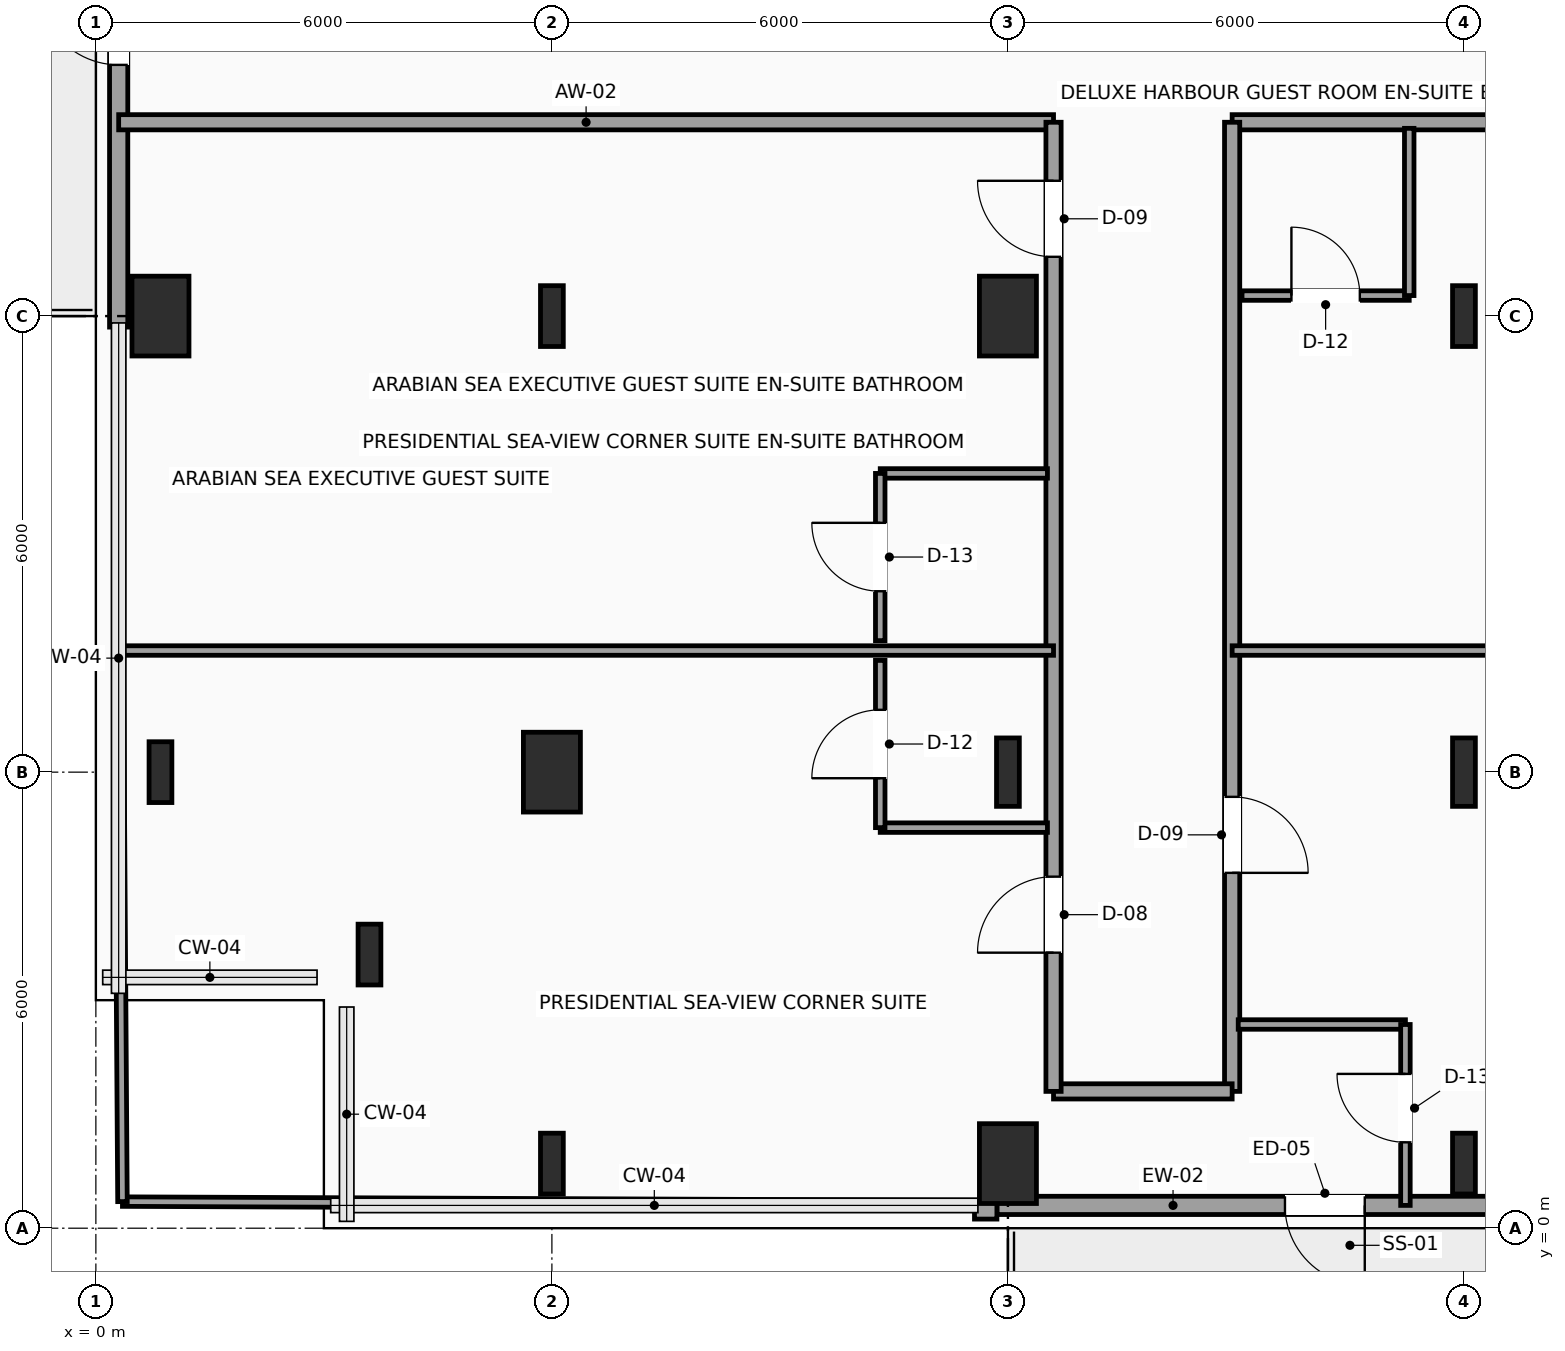
"""IFC4 building model, lengths in metres.
Left out: names, types, materials, properties, quantities, classifications, styles, units other than length and angle.
Written with IfcOpenShell. Run it as: python <this file> out.ifc"""

import sys

from ifc_helpers import new_model, si_unit, direction, frame, frame_2d, origin, origin_2d, place, context, subcontext, project, spatial, rectangle, i_section, extrude, element, fill, save


model = new_model("IFC4")
c1 = context("Model", 3, precision=1e-05, world=origin(), true_north=direction((0.0, 1.0)))
c2 = subcontext(c1, "Body", "Model", "MODEL_VIEW")
j1 = project(units=[si_unit("LENGTHUNIT", "METRE"), si_unit("PLANEANGLEUNIT", "RADIAN")], contexts=[c1])
p1 = place(None, origin())
s1 = spatial("IfcSite", under=j1, at=p1, CompositionType="ELEMENT")
p2 = place(p1, origin())
s2 = spatial("IfcBuilding", under=s1, at=p2, CompositionType="ELEMENT")
p3 = place(p2, frame((0.0, 0.0, 208.65)))
s3 = spatial("IfcBuildingStorey", under=s2, at=p3, CompositionType="ELEMENT", Elevation=208.65)
for number, where, z_axis, x_axis in (
    (1, (3.6, 3.6, 0.0), (0.0, 0.0, 1.0), (1.0, 0.0, 0.0)),
    (2, (0.85, 6.0, 0.0), (0.0, 0.0, 1.0), (1.0, 0.0, 0.0)),
):
    element("IfcColumn", number, at=place(p3, frame(where, z_axis=z_axis, x_axis=x_axis)), inside=s3, PredefinedType="COLUMN", context=c2, shape_type="SweptSolid", body=[
        extrude(i_section(OverallWidth=0.3, OverallDepth=0.8, WebThickness=0.018, FlangeThickness=0.033, FilletRadius=0.03, at=origin_2d()), origin(), (0.0, 0.0, 1.0), 3.75),
    ])
p4 = place(p3, frame((0.85, 12.0, 0.0), z_axis=(0.0, 0.0, 1.0), x_axis=(1.0, 0.0, 0.0)))
e3 = element("IfcColumn", 3, at=p4, inside=s3, PredefinedType="COLUMN", context=c2, shape_type="SweptSolid", body=[
    extrude(rectangle(XDim=0.75, YDim=1.05, at=origin_2d()), origin(), (0.0, 0.0, 1.0), 3.75),
])
p5 = place(p3, frame((6.0, 0.85, 0.0), z_axis=(0.0, 0.0, 1.0), x_axis=(1.0, 0.0, 0.0)))
e4 = element("IfcColumn", 4, at=p5, inside=s3, PredefinedType="COLUMN", context=c2, shape_type="SweptSolid", body=[
    extrude(i_section(OverallWidth=0.3, OverallDepth=0.8, WebThickness=0.018, FlangeThickness=0.033, FilletRadius=0.03, at=origin_2d()), origin(), (0.0, 0.0, 1.0), 3.75),
])
p6 = place(p3, frame((6.0, 6.0, 0.0), z_axis=(0.0, 0.0, 1.0), x_axis=(1.0, 0.0, 0.0)))
e5 = element("IfcColumn", 5, at=p6, inside=s3, PredefinedType="COLUMN", context=c2, shape_type="SweptSolid", body=[
    extrude(rectangle(XDim=0.75, YDim=1.05, at=origin_2d()), origin(), (0.0, 0.0, 1.0), 3.75),
])
p7 = place(p3, frame((6.0, 12.0, 0.0), z_axis=(0.0, 0.0, 1.0), x_axis=(1.0, 0.0, 0.0)))
e6 = element("IfcColumn", 6, at=p7, inside=s3, PredefinedType="COLUMN", context=c2, shape_type="SweptSolid", body=[
    extrude(i_section(OverallWidth=0.3, OverallDepth=0.8, WebThickness=0.018, FlangeThickness=0.033, FilletRadius=0.03, at=origin_2d()), origin(), (0.0, 0.0, 1.0), 3.75),
])
p8 = place(p3, frame((12.0, 0.85, 0.0), z_axis=(0.0, 0.0, 1.0), x_axis=(1.0, 0.0, 0.0)))
e7 = element("IfcColumn", 7, at=p8, inside=s3, PredefinedType="COLUMN", context=c2, shape_type="SweptSolid", body=[
    extrude(rectangle(XDim=0.75, YDim=1.05, at=origin_2d()), origin(), (0.0, 0.0, 1.0), 3.75),
])
p9 = place(p3, frame((12.0, 6.0, 0.0), z_axis=(0.0, 0.0, 1.0), x_axis=(1.0, 0.0, 0.0)))
e8 = element("IfcColumn", 8, at=p9, inside=s3, PredefinedType="COLUMN", context=c2, shape_type="SweptSolid", body=[
    extrude(i_section(OverallWidth=0.3, OverallDepth=0.9, WebThickness=0.019, FlangeThickness=0.035, FilletRadius=0.03, at=origin_2d()), origin(), (0.0, 0.0, 1.0), 3.75),
])
p10 = place(p3, frame((12.0, 12.0, 0.0), z_axis=(0.0, 0.0, 1.0), x_axis=(1.0, 0.0, 0.0)))
e9 = element("IfcColumn", 9, at=p10, inside=s3, PredefinedType="COLUMN", context=c2, shape_type="SweptSolid", body=[
    extrude(rectangle(XDim=0.75, YDim=1.05, at=origin_2d()), origin(), (0.0, 0.0, 1.0), 3.75),
])
p11 = place(p3, frame((18.0, 0.85, 0.0), z_axis=(0.0, 0.0, 1.0), x_axis=(1.0, 0.0, 0.0)))
e10 = element("IfcColumn", 10, at=p11, inside=s3, PredefinedType="COLUMN", context=c2, shape_type="SweptSolid", body=[
    extrude(i_section(OverallWidth=0.3, OverallDepth=0.8, WebThickness=0.018, FlangeThickness=0.033, FilletRadius=0.03, at=origin_2d()), origin(), (0.0, 0.0, 1.0), 3.75),
])
p12 = place(p3, frame((18.0, 6.0, 0.0), z_axis=(0.0, 0.0, 1.0), x_axis=(1.0, 0.0, 0.0)))
e11 = element("IfcColumn", 11, at=p12, inside=s3, PredefinedType="COLUMN", context=c2, shape_type="SweptSolid", body=[
    extrude(i_section(OverallWidth=0.3, OverallDepth=0.9, WebThickness=0.019, FlangeThickness=0.035, FilletRadius=0.03, at=origin_2d()), origin(), (0.0, 0.0, 1.0), 3.75),
])
p13 = place(p3, frame((18.0, 12.0, 0.0), z_axis=(0.0, 0.0, 1.0), x_axis=(1.0, 0.0, 0.0)))
e12 = element("IfcColumn", 12, at=p13, inside=s3, PredefinedType="COLUMN", context=c2, shape_type="SweptSolid", body=[
    extrude(i_section(OverallWidth=0.3, OverallDepth=0.8, WebThickness=0.018, FlangeThickness=0.033, FilletRadius=0.03, at=origin_2d()), origin(), (0.0, 0.0, 1.0), 3.75),
])
p14 = place(p3, frame((21.145, 0.3, 0.0), z_axis=(0.0, 0.0, 1.0), x_axis=(-1.0, 0.0, 0.0)))
e13 = element("IfcWall", 13, at=p14, inside=s3, PredefinedType="SOLIDWALL", context=c2, shape_type="SweptSolid", body=[
    extrude(rectangle(XDim=9.29, YDim=0.24, at=frame_2d((4.645, 0.0))), origin(), (0.0, 0.0, 1.0), 3.54),
])
p15 = place(p14, frame((4.45, 0.0, 0.0)))
e14 = element("IfcOpeningElement", 14, at=p15, cuts=e13, PredefinedType="OPENING", context=c2, shape_type="SweptSolid", body=[
    extrude(rectangle(XDim=1.05, YDim=2.2, at=frame_2d((0.525, 1.1))), frame((0.0, 0.13, 0.0), z_axis=(0.0, -1.0, 0.0), x_axis=(1.0, 0.0, 0.0)), (0.0, 0.0, 1.0), 0.26),
])
p16 = place(p14, frame((0.35, 0.0, 0.85)))
e15 = element("IfcOpeningElement", 15, at=p16, cuts=e13, PredefinedType="OPENING", context=c2, shape_type="SweptSolid", body=[
    extrude(rectangle(XDim=2.1, YDim=2.2, at=frame_2d((1.05, 1.1))), frame((0.0, 0.13, 0.0), z_axis=(0.0, -1.0, 0.0), x_axis=(1.0, 0.0, 0.0)), (0.0, 0.0, 1.0), 0.26),
])
p17 = place(p3, frame((0.3, 11.855, 0.0), z_axis=(0.0, 0.0, 1.0), x_axis=(0.0, 1.0, 0.0)))
e16 = element("IfcWall", 16, at=p17, inside=s3, PredefinedType="SOLIDWALL", context=c2, shape_type="SweptSolid", body=[
    extrude(rectangle(XDim=9.29, YDim=0.24, at=frame_2d((4.645, 0.0))), origin(), (0.0, 0.0, 1.0), 3.54),
])
p18 = place(p17, frame((3.45, 0.0, 0.0)))
e17 = element("IfcOpeningElement", 17, at=p18, cuts=e16, PredefinedType="OPENING", context=c2, shape_type="SweptSolid", body=[
    extrude(rectangle(XDim=1.05, YDim=2.2, at=frame_2d((0.525, 1.1))), frame((0.0, 0.13, 0.0), z_axis=(0.0, -1.0, 0.0), x_axis=(1.0, 0.0, 0.0)), (0.0, 0.0, 1.0), 0.26),
])
p19 = place(p3, frame((11.855, 0.24, 0.0), z_axis=(0.0, 0.0, 1.0), x_axis=(-1.0, 0.0, 0.0)))
e18 = element("IfcWall", 18, at=p19, inside=s3, PredefinedType="SOLIDWALL", context=c2, shape_type="SweptSolid", body=[
    extrude(rectangle(XDim=0.295, YDim=0.24, at=frame_2d((0.147, 0.0))), origin(), (0.0, 0.0, 1.0), 3.54),
])
p20 = place(p3, frame((12.6, 14.55, 0.0), z_axis=(0.0, 0.0, 1.0), x_axis=(-1.0, 0.0, 0.0)))
e19 = element("IfcWall", 19, at=p20, inside=s3, PredefinedType="PARTITIONING", context=c2, shape_type="SweptSolid", body=[
    extrude(rectangle(XDim=12.3, YDim=0.2, at=frame_2d((6.15, 0.0))), origin(), (0.0, 0.0, 1.0), 3.54),
])
p21 = place(p3, frame((23.95, 14.55, 0.0), z_axis=(0.0, 0.0, 1.0), x_axis=(-1.0, 0.0, 0.0)))
e20 = element("IfcWall", 20, at=p21, inside=s3, PredefinedType="PARTITIONING", context=c2, shape_type="SweptSolid", body=[
    extrude(rectangle(XDim=9.0, YDim=0.2, at=frame_2d((4.5, 0.0))), origin(), (0.0, 0.0, 1.0), 3.54),
])
p22 = place(p21, frame((2.815, 0.0, 0.0)))
e21 = element("IfcOpeningElement", 21, at=p22, cuts=e20, PredefinedType="OPENING", context=c2, shape_type="SweptSolid", body=[
    extrude(rectangle(XDim=1.0, YDim=2.2, at=frame_2d((0.5, 1.1))), frame((0.0, 0.11, 0.0), z_axis=(0.0, -1.0, 0.0), x_axis=(1.0, 0.0, 0.0)), (0.0, 0.0, 1.0), 0.22),
])
p23 = place(p3, frame((14.95, 14.55, 0.0), z_axis=(0.0, 0.0, 1.0), x_axis=(0.0, -1.0, 0.0)))
e22 = element("IfcWall", 22, at=p23, inside=s3, PredefinedType="PARTITIONING", context=c2, shape_type="SweptSolid", body=[
    extrude(rectangle(XDim=12.75, YDim=0.2, at=frame_2d((6.375, 0.0))), origin(), (0.0, 0.0, 1.0), 3.54),
])
p24 = place(p23, frame((8.875, 0.0, 0.0)))
e23 = element("IfcOpeningElement", 23, at=p24, cuts=e22, PredefinedType="OPENING", context=c2, shape_type="SweptSolid", body=[
    extrude(rectangle(XDim=1.0, YDim=2.2, at=frame_2d((0.5, 1.1))), frame((0.0, 0.11, 0.0), z_axis=(0.0, -1.0, 0.0), x_axis=(1.0, 0.0, 0.0)), (0.0, 0.0, 1.0), 0.22),
])
p25 = place(p3, frame((14.95, 1.8, 0.0), z_axis=(0.0, 0.0, 1.0), x_axis=(-1.0, 0.0, 0.0)))
e24 = element("IfcWall", 24, at=p25, inside=s3, PredefinedType="PARTITIONING", context=c2, shape_type="SweptSolid", body=[
    extrude(rectangle(XDim=2.35, YDim=0.2, at=frame_2d((1.175, 0.0))), origin(), (0.0, 0.0, 1.0), 3.54),
])
p26 = place(p3, frame((12.6, 1.8, 0.0), z_axis=(0.0, 0.0, 1.0), x_axis=(0.0, 1.0, 0.0)))
e25 = element("IfcWall", 25, at=p26, inside=s3, PredefinedType="PARTITIONING", context=c2, shape_type="SweptSolid", body=[
    extrude(rectangle(XDim=12.75, YDim=0.2, at=frame_2d((6.375, 0.0))), origin(), (0.0, 0.0, 1.0), 3.54),
])
p27 = place(p26, frame((1.825, 0.0, 0.0)))
e26 = element("IfcOpeningElement", 26, at=p27, cuts=e25, PredefinedType="OPENING", context=c2, shape_type="SweptSolid", body=[
    extrude(rectangle(XDim=1.0, YDim=2.2, at=frame_2d((0.5, 1.1))), frame((0.0, 0.11, 0.0), z_axis=(0.0, -1.0, 0.0), x_axis=(1.0, 0.0, 0.0)), (0.0, 0.0, 1.0), 0.22),
])
p28 = place(p26, frame((10.98, 0.0, 0.0)))
e27 = element("IfcOpeningElement", 27, at=p28, cuts=e25, PredefinedType="OPENING", context=c2, shape_type="SweptSolid", body=[
    extrude(rectangle(XDim=1.0, YDim=2.2, at=frame_2d((0.5, 1.1))), frame((0.0, 0.11, 0.0), z_axis=(0.0, -1.0, 0.0), x_axis=(1.0, 0.0, 0.0)), (0.0, 0.0, 1.0), 0.22),
])
p29 = place(p3, frame((0.35, 0.35, 0.0), z_axis=(0.0, 0.0, 1.0), x_axis=(0.999991617913, -0.004094398993, 0.0)))
e28 = element("IfcWall", 28, at=p29, inside=s3, PredefinedType="PARTITIONING", context=c2, shape_type="SweptSolid", body=[
    extrude(rectangle(XDim=11.21, YDim=0.125, at=frame_2d((5.605, 0.0))), origin(), (0.0, 0.0, 1.0), 3.54),
])
p30 = place(p3, frame((0.3, 7.6, 0.0), z_axis=(0.0, 0.0, 1.0), x_axis=(1.0, 0.0, 0.0)))
e29 = element("IfcWall", 29, at=p30, inside=s3, PredefinedType="PARTITIONING", context=c2, shape_type="SweptSolid", body=[
    extrude(rectangle(XDim=12.3, YDim=0.125, at=frame_2d((6.15, 0.0))), origin(), (0.0, 0.0, 1.0), 3.54),
])
p31 = place(p3, frame((0.35, 0.35, 0.0), z_axis=(0.0, 0.0, 1.0), x_axis=(-0.006903122154, 0.999976173168, 0.0)))
e30 = element("IfcWall", 30, at=p31, inside=s3, PredefinedType="PARTITIONING", context=c2, shape_type="SweptSolid", body=[
    extrude(rectangle(XDim=7.25, YDim=0.125, at=frame_2d((3.625, 0.0))), origin(), (0.0, 0.0, 1.0), 3.54),
])
p32 = place(p3, frame((10.32, 5.27, 0.0), z_axis=(0.0, 0.0, 1.0), x_axis=(1.0, 0.0, 0.0)))
e31 = element("IfcWall", 31, at=p32, inside=s3, PredefinedType="PARTITIONING", context=c2, shape_type="SweptSolid", body=[
    extrude(rectangle(XDim=2.2, YDim=0.125, at=frame_2d((1.1, 0.0))), origin(), (0.0, 0.0, 1.0), 3.54),
])
p33 = place(p3, frame((10.32, 5.27, 0.0), z_axis=(0.0, 0.0, 1.0), x_axis=(0.0, 1.0, 0.0)))
e32 = element("IfcWall", 32, at=p33, inside=s3, PredefinedType="PARTITIONING", context=c2, shape_type="SweptSolid", body=[
    extrude(rectangle(XDim=2.2, YDim=0.125, at=frame_2d((1.1, 0.0))), origin(), (0.0, 0.0, 1.0), 3.54),
])
p34 = place(p33, frame((0.65, 0.0, 0.0)))
e33 = element("IfcOpeningElement", 33, at=p34, cuts=e32, PredefinedType="OPENING", context=c2, shape_type="SweptSolid", body=[
    extrude(rectangle(XDim=0.9, YDim=2.1, at=frame_2d((0.45, 1.05))), frame((0.0, 0.073, 0.0), z_axis=(0.0, -1.0, 0.0), x_axis=(1.0, 0.0, 0.0)), (0.0, 0.0, 1.0), 0.145),
])
p35 = place(p3, frame((10.32, 9.93, 0.0), z_axis=(0.0, 0.0, 1.0), x_axis=(1.0, 0.0, 0.0)))
e34 = element("IfcWall", 34, at=p35, inside=s3, PredefinedType="PARTITIONING", context=c2, shape_type="SweptSolid", body=[
    extrude(rectangle(XDim=2.2, YDim=0.125, at=frame_2d((1.1, 0.0))), origin(), (0.0, 0.0, 1.0), 3.54),
])
p36 = place(p3, frame((10.32, 7.73, 0.0), z_axis=(0.0, 0.0, 1.0), x_axis=(0.0, 1.0, 0.0)))
e35 = element("IfcWall", 35, at=p36, inside=s3, PredefinedType="PARTITIONING", context=c2, shape_type="SweptSolid", body=[
    extrude(rectangle(XDim=2.2, YDim=0.125, at=frame_2d((1.1, 0.0))), origin(), (0.0, 0.0, 1.0), 3.54),
])
p37 = place(p36, frame((0.65, 0.0, 0.0)))
e36 = element("IfcOpeningElement", 36, at=p37, cuts=e35, PredefinedType="OPENING", context=c2, shape_type="SweptSolid", body=[
    extrude(rectangle(XDim=0.9, YDim=2.1, at=frame_2d((0.45, 1.05))), frame((0.0, 0.073, 0.0), z_axis=(0.0, -1.0, 0.0), x_axis=(1.0, 0.0, 0.0)), (0.0, 0.0, 1.0), 0.145),
])
p38 = place(p3, frame((14.95, 7.6, 0.0), z_axis=(0.0, 0.0, 1.0), x_axis=(1.0, 0.0, 0.0)))
e37 = element("IfcWall", 37, at=p38, inside=s3, PredefinedType="PARTITIONING", context=c2, shape_type="SweptSolid", body=[
    extrude(rectangle(XDim=9.0, YDim=0.125, at=frame_2d((4.5, 0.0))), origin(), (0.0, 0.0, 1.0), 3.54),
])
p39 = place(p3, frame((15.03, 2.68, 0.0), z_axis=(0.0, 0.0, 1.0), x_axis=(1.0, 0.0, 0.0)))
e38 = element("IfcWall", 38, at=p39, inside=s3, PredefinedType="PARTITIONING", context=c2, shape_type="SweptSolid", body=[
    extrude(rectangle(XDim=2.2, YDim=0.125, at=frame_2d((1.1, 0.0))), origin(), (0.0, 0.0, 1.0), 3.54),
])
p40 = place(p3, frame((17.23, 0.3, 0.0), z_axis=(0.0, 0.0, 1.0), x_axis=(0.0, 1.0, 0.0)))
e39 = element("IfcWall", 39, at=p40, inside=s3, PredefinedType="PARTITIONING", context=c2, shape_type="SweptSolid", body=[
    extrude(rectangle(XDim=2.38, YDim=0.125, at=frame_2d((1.19, 0.0))), origin(), (0.0, 0.0, 1.0), 3.54),
])
p41 = place(p40, frame((0.83, 0.0, 0.0)))
e40 = element("IfcOpeningElement", 40, at=p41, cuts=e39, PredefinedType="OPENING", context=c2, shape_type="SweptSolid", body=[
    extrude(rectangle(XDim=0.9, YDim=2.1, at=frame_2d((0.45, 1.05))), frame((0.0, 0.073, 0.0), z_axis=(0.0, -1.0, 0.0), x_axis=(1.0, 0.0, 0.0)), (0.0, 0.0, 1.0), 0.145),
])
p42 = place(p3, frame((15.08, 12.27, 0.0), z_axis=(0.0, 0.0, 1.0), x_axis=(1.0, 0.0, 0.0)))
e41 = element("IfcWall", 41, at=p42, inside=s3, PredefinedType="PARTITIONING", context=c2, shape_type="SweptSolid", body=[
    extrude(rectangle(XDim=2.2, YDim=0.125, at=frame_2d((1.1, 0.0))), origin(), (0.0, 0.0, 1.0), 3.132),
])
p43 = place(p42, frame((0.65, 0.0, 0.0)))
e42 = element("IfcOpeningElement", 42, at=p43, cuts=e41, PredefinedType="OPENING", context=c2, shape_type="SweptSolid", body=[
    extrude(rectangle(XDim=0.9, YDim=2.1, at=frame_2d((0.45, 1.05))), frame((0.0, 0.073, 0.0), z_axis=(0.0, -1.0, 0.0), x_axis=(1.0, 0.0, 0.0)), (0.0, 0.0, 1.0), 0.145),
])
p44 = place(p3, frame((17.28, 12.27, 0.0), z_axis=(0.0, 0.0, 1.0), x_axis=(0.0, 1.0, 0.0)))
e43 = element("IfcWall", 43, at=p44, inside=s3, PredefinedType="PARTITIONING", context=c2, shape_type="SweptSolid", body=[
    extrude(rectangle(XDim=2.2, YDim=0.125, at=frame_2d((1.1, 0.0))), origin(), (0.0, 0.0, 1.0), 3.54),
])
p45 = place(p15, origin())
e44 = element("IfcDoor", 44, at=p45, inside=s3, OperationType="SINGLE_SWING_LEFT", PredefinedType="DOOR", context=c2, shape_type="SweptSolid", body=[
    extrude(rectangle(XDim=1.05, YDim=2.2, at=frame_2d((0.525, 1.1))), frame((0.0, 0.025, 0.0), z_axis=(0.0, -1.0, 0.0), x_axis=(1.0, 0.0, 0.0)), (0.0, 0.0, 1.0), 0.05),
])
fill(e14, e44)
p46 = place(p18, origin())
e45 = element("IfcDoor", 45, at=p46, inside=s3, OperationType="SINGLE_SWING_RIGHT", PredefinedType="DOOR", context=c2, shape_type="SweptSolid", body=[
    extrude(rectangle(XDim=1.05, YDim=2.2, at=frame_2d((0.525, 1.1))), frame((0.0, 0.025, 0.0), z_axis=(0.0, -1.0, 0.0), x_axis=(1.0, 0.0, 0.0)), (0.0, 0.0, 1.0), 0.05),
])
fill(e17, e45)
p47 = place(p24, origin())
e46 = element("IfcDoor", 46, at=p47, inside=s3, OperationType="SINGLE_SWING_RIGHT", PredefinedType="DOOR", context=c2, shape_type="SweptSolid", body=[
    extrude(rectangle(XDim=1.0, YDim=2.2, at=frame_2d((0.5, 1.1))), frame((0.0, 0.025, 0.0), z_axis=(0.0, -1.0, 0.0), x_axis=(1.0, 0.0, 0.0)), (0.0, 0.0, 1.0), 0.05),
])
fill(e23, e46)
p48 = place(p27, origin())
e47 = element("IfcDoor", 47, at=p48, inside=s3, OperationType="SINGLE_SWING_LEFT", PredefinedType="DOOR", context=c2, shape_type="SweptSolid", body=[
    extrude(rectangle(XDim=1.0, YDim=2.2, at=frame_2d((0.5, 1.1))), frame((0.0, 0.025, 0.0), z_axis=(0.0, -1.0, 0.0), x_axis=(1.0, 0.0, 0.0)), (0.0, 0.0, 1.0), 0.05),
])
fill(e26, e47)
p49 = place(p28, origin())
e48 = element("IfcDoor", 48, at=p49, inside=s3, OperationType="SINGLE_SWING_RIGHT", PredefinedType="DOOR", context=c2, shape_type="SweptSolid", body=[
    extrude(rectangle(XDim=1.0, YDim=2.2, at=frame_2d((0.5, 1.1))), frame((0.0, 0.025, 0.0), z_axis=(0.0, -1.0, 0.0), x_axis=(1.0, 0.0, 0.0)), (0.0, 0.0, 1.0), 0.05),
])
fill(e27, e48)
p50 = place(p34, origin())
e49 = element("IfcDoor", 49, at=p50, inside=s3, OperationType="SINGLE_SWING_LEFT", PredefinedType="DOOR", context=c2, shape_type="SweptSolid", body=[
    extrude(rectangle(XDim=0.9, YDim=2.1, at=frame_2d((0.45, 1.05))), frame((0.0, 0.025, 0.0), z_axis=(0.0, -1.0, 0.0), x_axis=(1.0, 0.0, 0.0)), (0.0, 0.0, 1.0), 0.05),
])
fill(e33, e49)
p51 = place(p37, origin())
e50 = element("IfcDoor", 50, at=p51, inside=s3, OperationType="SINGLE_SWING_RIGHT", PredefinedType="DOOR", context=c2, shape_type="SweptSolid", body=[
    extrude(rectangle(XDim=0.9, YDim=2.1, at=frame_2d((0.45, 1.05))), frame((0.0, 0.025, 0.0), z_axis=(0.0, -1.0, 0.0), x_axis=(1.0, 0.0, 0.0)), (0.0, 0.0, 1.0), 0.05),
])
fill(e36, e50)
p52 = place(p41, origin())
e51 = element("IfcDoor", 51, at=p52, inside=s3, OperationType="SINGLE_SWING_RIGHT", PredefinedType="DOOR", context=c2, shape_type="SweptSolid", body=[
    extrude(rectangle(XDim=0.9, YDim=2.1, at=frame_2d((0.45, 1.05))), frame((0.0, 0.025, 0.0), z_axis=(0.0, -1.0, 0.0), x_axis=(1.0, 0.0, 0.0)), (0.0, 0.0, 1.0), 0.05),
])
fill(e40, e51)
p53 = place(p43, origin())
e52 = element("IfcDoor", 52, at=p53, inside=s3, OperationType="SINGLE_SWING_LEFT", PredefinedType="DOOR", context=c2, shape_type="SweptSolid", body=[
    extrude(rectangle(XDim=0.9, YDim=2.1, at=frame_2d((0.45, 1.05))), frame((0.0, 0.025, 0.0), z_axis=(0.0, -1.0, 0.0), x_axis=(1.0, 0.0, 0.0)), (0.0, 0.0, 1.0), 0.05),
])
fill(e42, e52)
save(model, sys.argv[1])
